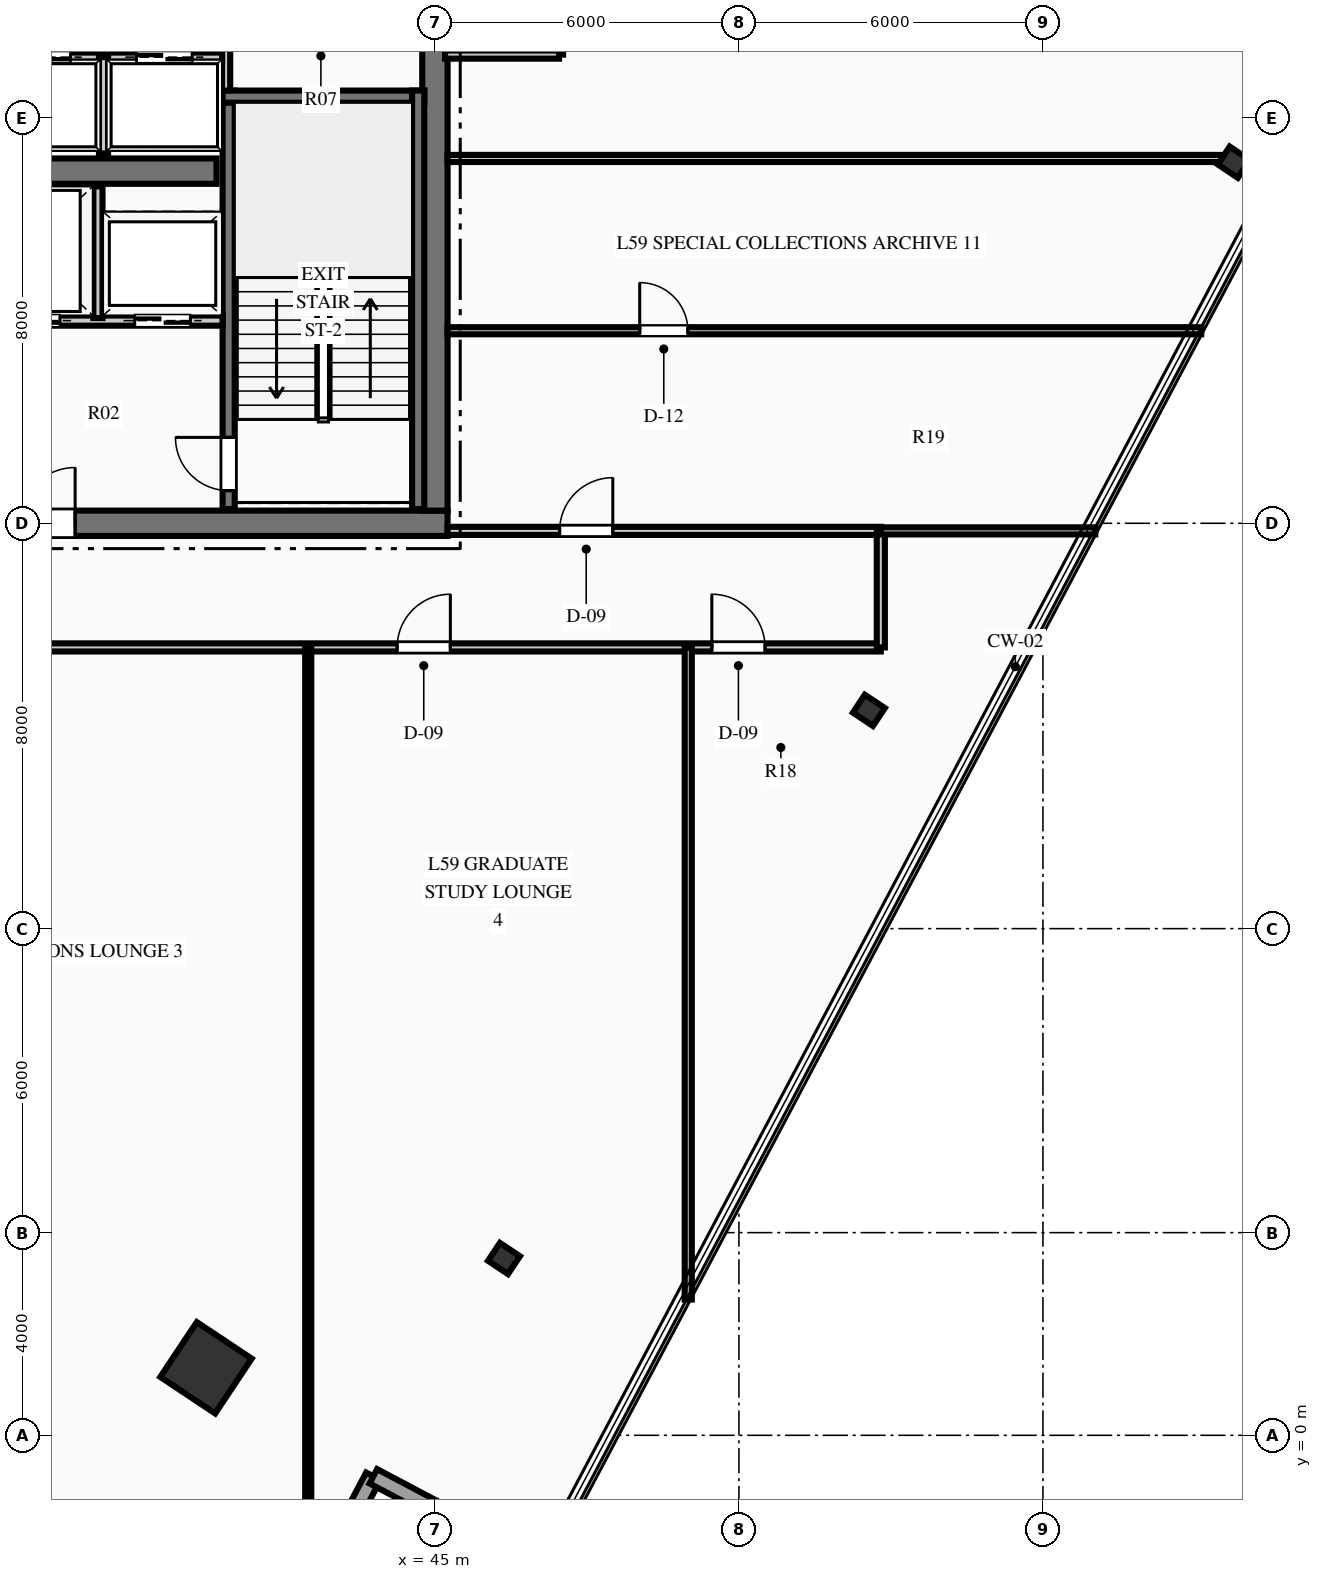
"""IFC4 building model, lengths in metres.
Left out: names, types, materials, properties, quantities, classifications, styles, units other than length and angle.
Written with IfcOpenShell. Run it as: python <this file> out.ifc"""

import sys

from ifc_helpers import new_model, si_unit, direction, frame, frame_2d, origin, origin_2d, place, context, subcontext, project, spatial, rectangle, hollow_rectangle, i_section, extrude, element, fill, save


model = new_model("IFC4")
c1 = context("Model", 3, precision=1e-05, world=origin(), true_north=direction((0.0, 1.0)))
c2 = subcontext(c1, "Body", "Model", "MODEL_VIEW")
j1 = project(units=[si_unit("LENGTHUNIT", "METRE"), si_unit("PLANEANGLEUNIT", "RADIAN")], contexts=[c1])
p1 = place(None, origin())
s1 = spatial("IfcSite", under=j1, at=p1, CompositionType="ELEMENT")
p2 = place(p1, origin())
s2 = spatial("IfcBuilding", under=s1, at=p2, CompositionType="ELEMENT")
p3 = place(p2, frame((0.0, 0.0, 235.95)))
s3 = spatial("IfcBuildingStorey", under=s2, at=p3, CompositionType="ELEMENT", Elevation=235.95)
p4 = place(p3, frame((26.75, 18.0, 0.0), z_axis=(0.0, 0.0, 1.0), x_axis=(1.0, 0.0, 0.0)))
e1 = element("IfcWall", 1, at=p4, inside=s3, PredefinedType="SHEAR", context=c2, shape_type="SweptSolid", body=[
    extrude(rectangle(XDim=18.5, YDim=0.5, at=frame_2d((9.25, 0.0))), origin(), (0.0, 0.0, 1.0), 3.75),
])
p5 = place(p4, frame((7.35, 0.0, 0.0)))
e2 = element("IfcOpeningElement", 2, at=p5, cuts=e1, PredefinedType="OPENING", context=c2, shape_type="SweptSolid", body=[
    extrude(rectangle(XDim=1.1, YDim=2.15, at=frame_2d((0.55, 1.075))), frame((0.0, 0.26, 0.0), z_axis=(0.0, -1.0, 0.0), x_axis=(1.0, 0.0, 0.0)), (0.0, 0.0, 1.0), 0.52),
])
p6 = place(p4, frame((10.05, 0.0, 0.0)))
e3 = element("IfcOpeningElement", 3, at=p6, cuts=e1, PredefinedType="OPENING", context=c2, shape_type="SweptSolid", body=[
    extrude(rectangle(XDim=1.1, YDim=2.15, at=frame_2d((0.55, 1.075))), frame((0.0, 0.26, 0.0), z_axis=(0.0, -1.0, 0.0), x_axis=(1.0, 0.0, 0.0)), (0.0, 0.0, 1.0), 0.52),
])
p7 = place(p3, frame((45.0, 18.25, 0.0), z_axis=(0.0, 0.0, 1.0), x_axis=(0.0, 1.0, 0.0)))
e4 = element("IfcWall", 4, at=p7, inside=s3, PredefinedType="SHEAR", context=c2, shape_type="SweptSolid", body=[
    extrude(rectangle(XDim=15.5, YDim=0.5, at=frame_2d((7.75, 0.0))), origin(), (0.0, 0.0, 1.0), 3.75),
])
p8 = place(p7, frame((9.99, 0.0, 0.0)))
e5 = element("IfcOpeningElement", 5, at=p8, cuts=e4, PredefinedType="OPENING", context=c2, shape_type="SweptSolid", body=[
    extrude(rectangle(XDim=1.4, YDim=2.2, at=frame_2d((0.7, 1.1))), frame((0.0, 0.26, 0.0), z_axis=(0.0, -1.0, 0.0), x_axis=(1.0, 0.0, 0.0)), (0.0, 0.0, 1.0), 0.52),
])
p9 = place(p3, frame((31.31, 24.95, 0.0), z_axis=(0.0, 0.0, 1.0), x_axis=(1.0, 0.0, 0.0)))
e6 = element("IfcWall", 6, at=p9, inside=s3, PredefinedType="SHEAR", context=c2, shape_type="SweptSolid", body=[
    extrude(rectangle(XDim=9.38, YDim=0.5, at=frame_2d((4.69, 0.0))), origin(), (0.0, 0.0, 1.0), 3.75),
])
p10 = place(p3, frame((40.93, 18.28, 0.0), z_axis=(0.0, 0.0, 1.0), x_axis=(0.0, 1.0, 0.0)))
e7 = element("IfcWall", 7, at=p10, inside=s3, PredefinedType="SHEAR", context=c2, shape_type="SweptSolid", body=[
    extrude(rectangle(XDim=8.26, YDim=0.24, at=frame_2d((4.13, 0.0))), origin(), (0.0, 0.0, 1.0), 3.75),
])
p11 = place(p10, frame((0.365, 0.0, 0.0)))
e8 = element("IfcOpeningElement", 8, at=p11, cuts=e7, PredefinedType="OPENING", context=c2, shape_type="SweptSolid", body=[
    extrude(rectangle(XDim=1.05, YDim=2.15, at=frame_2d((0.525, 1.075))), frame((0.0, 0.13, 0.0), z_axis=(0.0, -1.0, 0.0), x_axis=(1.0, 0.0, 0.0)), (0.0, 0.0, 1.0), 0.26),
])
p12 = place(p3, frame((40.81, 26.42, 0.0), z_axis=(0.0, 0.0, 1.0), x_axis=(1.0, 0.0, 0.0)))
e9 = element("IfcWall", 9, at=p12, inside=s3, PredefinedType="SHEAR", context=c2, shape_type="SweptSolid", body=[
    extrude(rectangle(XDim=3.98, YDim=0.24, at=frame_2d((1.99, 0.0))), origin(), (0.0, 0.0, 1.0), 3.75),
])
p13 = place(p3, frame((44.67, 18.28, 0.0), z_axis=(0.0, 0.0, 1.0), x_axis=(0.0, 1.0, 0.0)))
e10 = element("IfcWall", 10, at=p13, inside=s3, PredefinedType="SHEAR", context=c2, shape_type="SweptSolid", body=[
    extrude(rectangle(XDim=8.26, YDim=0.24, at=frame_2d((4.13, 0.0))), origin(), (0.0, 0.0, 1.0), 3.75),
])
p14 = place(p3, frame((40.483, 1.333, 0.0), z_axis=(0.0, 0.0, 1.0), x_axis=(0.554118199338, 0.832437998389, 0.0)))
e11 = element("IfcColumn", 11, at=p14, inside=s3, PredefinedType="COLUMN", context=c2, shape_type="SweptSolid", body=[
    extrude(hollow_rectangle(XDim=1.3, YDim=1.3, WallThickness=0.06, at=origin_2d()), origin(), (0.0, 0.0, 1.0), 3.75),
])
for number, where, z_axis, x_axis in (
    (12, (46.363, 3.49, 0.0), (0.0, 0.0, 1.0), (0.554, 0.832, 0.0)),
    (13, (53.564, 14.308, 0.0), (0.0, 0.0, 1.0), (0.554, 0.832, 0.0)),
    (14, (60.766, 25.126, 0.0), (0.0, 0.0, 1.0), (0.554, 0.832, 0.0)),
):
    element("IfcColumn", number, at=place(p3, frame(where, z_axis=z_axis, x_axis=x_axis)), inside=s3, PredefinedType="COLUMN", context=c2, shape_type="SweptSolid", body=[
        extrude(i_section(OverallWidth=0.424, OverallDepth=0.474, WebThickness=0.048, FlangeThickness=0.077, at=origin_2d()), origin(), (0.0, 0.0, 1.0), 3.75),
    ])
for number, where, z_axis, x_axis in (
    (15, (43.785, -0.809, 0.0), (0.0, 0.0, 1.0), (-0.468, -0.884, 0.0)),
    (16, (47.232, -2.634, 0.0), (0.0, 0.0, 1.0), (-0.884, 0.468, 0.0)),
):
    element("IfcWall", number, at=place(p3, frame(where, z_axis=z_axis, x_axis=x_axis)), inside=s3, PredefinedType="STANDARD", context=c2, shape_type="SweptSolid", body=[
        extrude(rectangle(XDim=3.9, YDim=0.32, at=frame_2d((1.95, 0.0))), origin(), (0.0, 0.0, 1.0), 3.4),
    ])
p15 = place(p3, frame((36.12, 22.0, 0.0), z_axis=(0.0, 0.0, 1.0), x_axis=(1.0, 0.0, 0.0)))
e17 = element("IfcWall", 17, at=p15, inside=s3, PredefinedType="PARTITIONING", context=c2, shape_type="SweptSolid", body=[
    extrude(rectangle(XDim=4.69, YDim=0.2, at=frame_2d((2.345, 0.0))), origin(), (0.0, 0.0, 1.0), 3.4),
])
p16 = place(p15, frame((2.955, 0.0, 0.0)))
e18 = element("IfcOpeningElement", 18, at=p16, cuts=e17, PredefinedType="OPENING", context=c2, shape_type="SweptSolid", body=[
    extrude(rectangle(XDim=1.1, YDim=2.15, at=frame_2d((0.55, 1.075))), frame((0.0, 0.11, 0.0), z_axis=(0.0, -1.0, 0.0), x_axis=(1.0, 0.0, 0.0)), (0.0, 0.0, 1.0), 0.22),
])
p17 = place(p15, frame((0.08, 0.0, 0.0)))
e19 = element("IfcOpeningElement", 19, at=p17, cuts=e17, PredefinedType="OPENING", context=c2, shape_type="SweptSolid", body=[
    extrude(rectangle(XDim=1.4, YDim=2.2, at=frame_2d((0.7, 1.1))), frame((0.0, 0.11, 0.0), z_axis=(0.0, -1.0, 0.0), x_axis=(1.0, 0.0, 0.0)), (0.0, 0.0, 1.0), 0.22),
])
p18 = place(p3, frame((38.35, 22.05, 0.0), z_axis=(0.0, 0.0, 1.0), x_axis=(0.0, 1.0, 0.0)))
e20 = element("IfcWall", 20, at=p18, inside=s3, PredefinedType="PARTITIONING", context=c2, shape_type="SweptSolid", body=[
    extrude(rectangle(XDim=2.6, YDim=0.18, at=frame_2d((1.3, 0.0))), origin(), (0.0, 0.0, 1.0), 3.4),
])
p19 = place(p3, frame((40.88, 26.54, 0.0), z_axis=(0.0, 0.0, 1.0), x_axis=(0.0, 1.0, 0.0)))
e21 = element("IfcWall", 21, at=p19, inside=s3, PredefinedType="PARTITIONING", context=c2, shape_type="SweptSolid", body=[
    extrude(rectangle(XDim=1.51, YDim=0.16, at=frame_2d((0.755, 0.0))), origin(), (0.0, 0.0, 1.0), 3.4),
])
p20 = place(p3, frame((31.2, 27.2, 0.0), z_axis=(0.0, 0.0, 1.0), x_axis=(1.0, 0.0, 0.0)))
e22 = element("IfcWall", 22, at=p20, inside=s3, PredefinedType="PARTITIONING", context=c2, shape_type="SweptSolid", body=[
    extrude(rectangle(XDim=9.6, YDim=0.18, at=frame_2d((4.8, 0.0))), origin(), (0.0, 0.0, 1.0), 3.4),
])
p21 = place(p20, frame((0.59, 0.0, 0.0)))
e23 = element("IfcOpeningElement", 23, at=p21, cuts=e22, PredefinedType="OPENING", context=c2, shape_type="SweptSolid", body=[
    extrude(rectangle(XDim=1.1, YDim=2.15, at=frame_2d((0.55, 1.075))), frame((0.0, 0.1, 0.0), z_axis=(0.0, -1.0, 0.0), x_axis=(1.0, 0.0, 0.0)), (0.0, 0.0, 1.0), 0.2),
])
p22 = place(p20, frame((2.99, 0.0, 0.0)))
e24 = element("IfcOpeningElement", 24, at=p22, cuts=e22, PredefinedType="OPENING", context=c2, shape_type="SweptSolid", body=[
    extrude(rectangle(XDim=1.1, YDim=2.15, at=frame_2d((0.55, 1.075))), frame((0.0, 0.1, 0.0), z_axis=(0.0, -1.0, 0.0), x_axis=(1.0, 0.0, 0.0)), (0.0, 0.0, 1.0), 0.2),
])
p23 = place(p20, frame((5.51, 0.0, 0.0)))
e25 = element("IfcOpeningElement", 25, at=p23, cuts=e22, PredefinedType="OPENING", context=c2, shape_type="SweptSolid", body=[
    extrude(rectangle(XDim=1.1, YDim=2.15, at=frame_2d((0.55, 1.075))), frame((0.0, 0.1, 0.0), z_axis=(0.0, -1.0, 0.0), x_axis=(1.0, 0.0, 0.0)), (0.0, 0.0, 1.0), 0.2),
])
p24 = place(p20, frame((7.91, 0.0, 0.0)))
e26 = element("IfcOpeningElement", 26, at=p24, cuts=e22, PredefinedType="OPENING", context=c2, shape_type="SweptSolid", body=[
    extrude(rectangle(XDim=1.1, YDim=2.15, at=frame_2d((0.55, 1.075))), frame((0.0, 0.1, 0.0), z_axis=(0.0, -1.0, 0.0), x_axis=(1.0, 0.0, 0.0)), (0.0, 0.0, 1.0), 0.2),
])
p25 = place(p3, frame((38.46, 25.3, 0.0), z_axis=(0.0, 0.0, 1.0), x_axis=(0.0, 1.0, 0.0)))
e27 = element("IfcWall", 27, at=p25, inside=s3, PredefinedType="PARTITIONING", context=c2, shape_type="SweptSolid", body=[
    extrude(rectangle(XDim=1.9, YDim=0.18, at=frame_2d((0.95, 0.0))), origin(), (0.0, 0.0, 1.0), 3.4),
])
p26 = place(p3, frame((18.2, 15.55, 0.0), z_axis=(0.0, 0.0, 1.0), x_axis=(1.0, 0.0, 0.0)))
e28 = element("IfcWall", 28, at=p26, inside=s3, PredefinedType="PARTITIONING", context=c2, shape_type="SweptSolid", body=[
    extrude(rectangle(XDim=35.6, YDim=0.16, at=frame_2d((17.8, 0.0))), origin(), (0.0, 0.0, 1.0), 2.938),
])
p27 = place(p26, frame((2.625, 0.0, 0.0)))
e29 = element("IfcOpeningElement", 29, at=p27, cuts=e28, PredefinedType="OPENING", context=c2, shape_type="SweptSolid", body=[
    extrude(rectangle(XDim=1.05, YDim=2.15, at=frame_2d((0.525, 1.075))), frame((0.0, 0.09, 0.0), z_axis=(0.0, -1.0, 0.0), x_axis=(1.0, 0.0, 0.0)), (0.0, 0.0, 1.0), 0.18),
])
p28 = place(p26, frame((9.335, 0.0, 0.0)))
e30 = element("IfcOpeningElement", 30, at=p28, cuts=e28, PredefinedType="OPENING", context=c2, shape_type="SweptSolid", body=[
    extrude(rectangle(XDim=1.05, YDim=2.15, at=frame_2d((0.525, 1.075))), frame((0.0, 0.09, 0.0), z_axis=(0.0, -1.0, 0.0), x_axis=(1.0, 0.0, 0.0)), (0.0, 0.0, 1.0), 0.18),
])
p29 = place(p26, frame((17.775, 0.0, 0.0)))
e31 = element("IfcOpeningElement", 31, at=p29, cuts=e28, PredefinedType="OPENING", context=c2, shape_type="SweptSolid", body=[
    extrude(rectangle(XDim=1.05, YDim=2.15, at=frame_2d((0.525, 1.075))), frame((0.0, 0.09, 0.0), z_axis=(0.0, -1.0, 0.0), x_axis=(1.0, 0.0, 0.0)), (0.0, 0.0, 1.0), 0.18),
])
p30 = place(p26, frame((26.055, 0.0, 0.0)))
e32 = element("IfcOpeningElement", 32, at=p30, cuts=e28, PredefinedType="OPENING", context=c2, shape_type="SweptSolid", body=[
    extrude(rectangle(XDim=1.05, YDim=2.15, at=frame_2d((0.525, 1.075))), frame((0.0, 0.09, 0.0), z_axis=(0.0, -1.0, 0.0), x_axis=(1.0, 0.0, 0.0)), (0.0, 0.0, 1.0), 0.18),
])
p31 = place(p26, frame((32.265, 0.0, 0.0)))
e33 = element("IfcOpeningElement", 33, at=p31, cuts=e28, PredefinedType="OPENING", context=c2, shape_type="SweptSolid", body=[
    extrude(rectangle(XDim=1.05, YDim=2.15, at=frame_2d((0.525, 1.075))), frame((0.0, 0.09, 0.0), z_axis=(0.0, -1.0, 0.0), x_axis=(1.0, 0.0, 0.0)), (0.0, 0.0, 1.0), 0.18),
])
p32 = place(p3, frame((45.25, 17.85, 0.0), z_axis=(0.0, 0.0, 1.0), x_axis=(1.0, 0.0, 0.0)))
e34 = element("IfcWall", 34, at=p32, inside=s3, PredefinedType="PARTITIONING", context=c2, shape_type="SweptSolid", body=[
    extrude(rectangle(XDim=8.55, YDim=0.16, at=frame_2d((4.275, 0.0))), origin(), (0.0, 0.0, 1.0), 3.4),
])
p33 = place(p32, frame((2.211, 0.0, 0.0)))
e35 = element("IfcOpeningElement", 35, at=p33, cuts=e34, PredefinedType="OPENING", context=c2, shape_type="SweptSolid", body=[
    extrude(rectangle(XDim=1.05, YDim=2.15, at=frame_2d((0.525, 1.075))), frame((0.0, 0.09, 0.0), z_axis=(0.0, -1.0, 0.0), x_axis=(1.0, 0.0, 0.0)), (0.0, 0.0, 1.0), 0.18),
])
p34 = place(p3, frame((47.45, 27.25, 0.0), z_axis=(0.0, 0.0, 1.0), x_axis=(0.0, 1.0, 0.0)))
e36 = element("IfcWall", 36, at=p34, inside=s3, PredefinedType="PARTITIONING", context=c2, shape_type="SweptSolid", body=[
    extrude(rectangle(XDim=6.9, YDim=0.16, at=frame_2d((3.45, 0.0))), origin(), (0.0, 0.0, 1.0), 3.4),
])
p35 = place(p34, frame((1.683, 0.0, 0.0)))
e37 = element("IfcOpeningElement", 37, at=p35, cuts=e36, PredefinedType="OPENING", context=c2, shape_type="SweptSolid", body=[
    extrude(rectangle(XDim=1.05, YDim=2.15, at=frame_2d((0.525, 1.075))), frame((0.0, 0.09, 0.0), z_axis=(0.0, -1.0, 0.0), x_axis=(1.0, 0.0, 0.0)), (0.0, 0.0, 1.0), 0.18),
])
p36 = place(p3, frame((45.2, 27.25, 0.0), z_axis=(0.0, 0.0, 1.0), x_axis=(1.0, 0.0, 0.0)))
e38 = element("IfcWall", 38, at=p36, inside=s3, PredefinedType="PARTITIONING", context=c2, shape_type="SweptSolid", body=[
    extrude(rectangle(XDim=2.25, YDim=0.16, at=frame_2d((1.125, 0.0))), origin(), (0.0, 0.0, 1.0), 3.4),
])
p37 = place(p3, frame((53.8, 15.55, 0.0), z_axis=(0.0, 0.0, 1.0), x_axis=(0.0, 1.0, 0.0)))
e39 = element("IfcWall", 39, at=p37, inside=s3, PredefinedType="PARTITIONING", context=c2, shape_type="SweptSolid", body=[
    extrude(rectangle(XDim=2.3, YDim=0.16, at=frame_2d((1.15, 0.0))), origin(), (0.0, 0.0, 1.0), 3.4),
])
p38 = place(p3, frame((53.8, 17.85, 0.0), z_axis=(0.0, 0.0, 1.0), x_axis=(1.0, 0.0, 0.0)))
e40 = element("IfcWall", 40, at=p38, inside=s3, PredefinedType="PARTITIONING", context=c2, shape_type="SweptSolid", body=[
    extrude(rectangle(XDim=4.232, YDim=0.14, at=frame_2d((2.116, 0.0))), origin(), (0.0, 0.0, 1.0), 3.4),
])
p39 = place(p3, frame((42.5, -3.151, 0.0), z_axis=(0.0, 0.0, 1.0), x_axis=(0.0, 1.0, 0.0)))
e41 = element("IfcWall", 41, at=p39, inside=s3, PredefinedType="PARTITIONING", context=c2, shape_type="SweptSolid", body=[
    extrude(rectangle(XDim=18.701, YDim=0.12, at=frame_2d((9.351, 0.0))), origin(), (0.0, 0.0, 1.0), 3.4),
])
p40 = place(p3, frame((50.0, 2.68, 0.0), z_axis=(0.0, 0.0, 1.0), x_axis=(0.0, 1.0, 0.0)))
e42 = element("IfcWall", 42, at=p40, inside=s3, PredefinedType="PARTITIONING", context=c2, shape_type="SweptSolid", body=[
    extrude(rectangle(XDim=12.87, YDim=0.14, at=frame_2d((6.435, 0.0))), origin(), (0.0, 0.0, 1.0), 3.4),
])
p41 = place(p3, frame((45.25, 21.8, 0.0), z_axis=(0.0, 0.0, 1.0), x_axis=(1.0, 0.0, 0.0)))
e43 = element("IfcWall", 43, at=p41, inside=s3, PredefinedType="PARTITIONING", context=c2, shape_type="SweptSolid", body=[
    extrude(rectangle(XDim=14.874, YDim=0.14, at=frame_2d((7.437, 0.0))), origin(), (0.0, 0.0, 1.0), 3.4),
])
p42 = place(p41, frame((3.792, 0.0, 0.0)))
e44 = element("IfcOpeningElement", 44, at=p42, cuts=e43, PredefinedType="OPENING", context=c2, shape_type="SweptSolid", body=[
    extrude(rectangle(XDim=0.95, YDim=2.15, at=frame_2d((0.475, 1.075))), frame((0.0, 0.08, 0.0), z_axis=(0.0, -1.0, 0.0), x_axis=(1.0, 0.0, 0.0)), (0.0, 0.0, 1.0), 0.16),
])
p43 = place(p3, frame((45.25, 25.2, 0.0), z_axis=(0.0, 0.0, 1.0), x_axis=(1.0, 0.0, 0.0)))
e45 = element("IfcWall", 45, at=p43, inside=s3, PredefinedType="PARTITIONING", context=c2, shape_type="SweptSolid", body=[
    extrude(rectangle(XDim=16.674, YDim=0.14, at=frame_2d((8.337, 0.0))), origin(), (0.0, 0.0, 1.0), 2.779),
])
p44 = place(p11, origin())
e46 = element("IfcDoor", 46, at=p44, inside=s3, OperationType="SINGLE_SWING_RIGHT", PredefinedType="DOOR", context=c2, shape_type="SweptSolid", body=[
    extrude(rectangle(XDim=1.05, YDim=2.15, at=frame_2d((0.525, 1.075))), frame((0.0, 0.025, 0.0), z_axis=(0.0, -1.0, 0.0), x_axis=(1.0, 0.0, 0.0)), (0.0, 0.0, 1.0), 0.05),
])
fill(e8, e46)
p45 = place(p6, origin())
e47 = element("IfcDoor", 47, at=p45, inside=s3, OperationType="SINGLE_SWING_RIGHT", PredefinedType="DOOR", context=c2, shape_type="SweptSolid", body=[
    extrude(rectangle(XDim=1.1, YDim=2.15, at=frame_2d((0.55, 1.075))), frame((0.0, 0.025, 0.0), z_axis=(0.0, -1.0, 0.0), x_axis=(1.0, 0.0, 0.0)), (0.0, 0.0, 1.0), 0.05),
])
fill(e3, e47)
p46 = place(p30, origin())
e48 = element("IfcDoor", 48, at=p46, inside=s3, OperationType="SINGLE_SWING_RIGHT", PredefinedType="DOOR", context=c2, shape_type="SweptSolid", body=[
    extrude(rectangle(XDim=1.05, YDim=2.15, at=frame_2d((0.525, 1.075))), frame((0.0, 0.025, 0.0), z_axis=(0.0, -1.0, 0.0), x_axis=(1.0, 0.0, 0.0)), (0.0, 0.0, 1.0), 0.05),
])
fill(e32, e48)
p47 = place(p31, origin())
e49 = element("IfcDoor", 49, at=p47, inside=s3, OperationType="SINGLE_SWING_LEFT", PredefinedType="DOOR", context=c2, shape_type="SweptSolid", body=[
    extrude(rectangle(XDim=1.05, YDim=2.15, at=frame_2d((0.525, 1.075))), frame((0.0, 0.025, 0.0), z_axis=(0.0, -1.0, 0.0), x_axis=(1.0, 0.0, 0.0)), (0.0, 0.0, 1.0), 0.05),
])
fill(e33, e49)
p48 = place(p33, origin())
e50 = element("IfcDoor", 50, at=p48, inside=s3, OperationType="SINGLE_SWING_RIGHT", PredefinedType="DOOR", context=c2, shape_type="SweptSolid", body=[
    extrude(rectangle(XDim=1.05, YDim=2.15, at=frame_2d((0.525, 1.075))), frame((0.0, 0.025, 0.0), z_axis=(0.0, -1.0, 0.0), x_axis=(1.0, 0.0, 0.0)), (0.0, 0.0, 1.0), 0.05),
])
fill(e35, e50)
p49 = place(p42, origin())
e51 = element("IfcDoor", 51, at=p49, inside=s3, OperationType="SINGLE_SWING_LEFT", PredefinedType="DOOR", context=c2, shape_type="SweptSolid", body=[
    extrude(rectangle(XDim=0.95, YDim=2.15, at=frame_2d((0.475, 1.075))), frame((0.0, 0.025, 0.0), z_axis=(0.0, -1.0, 0.0), x_axis=(1.0, 0.0, 0.0)), (0.0, 0.0, 1.0), 0.05),
])
fill(e44, e51)
p50 = place(p23, origin())
e52 = element("IfcDoor", 52, at=p50, inside=s3, OperationType="SLIDING_TO_LEFT", PredefinedType="DOOR", context=c2, shape_type="SweptSolid", body=[
    extrude(rectangle(XDim=1.1, YDim=2.15, at=frame_2d((0.55, 1.075))), frame((0.0, 0.025, 0.0), z_axis=(0.0, -1.0, 0.0), x_axis=(1.0, 0.0, 0.0)), (0.0, 0.0, 1.0), 0.05),
])
fill(e25, e52)
p51 = place(p24, origin())
e53 = element("IfcDoor", 53, at=p51, inside=s3, OperationType="SLIDING_TO_LEFT", PredefinedType="DOOR", context=c2, shape_type="SweptSolid", body=[
    extrude(rectangle(XDim=1.1, YDim=2.15, at=frame_2d((0.55, 1.075))), frame((0.0, 0.025, 0.0), z_axis=(0.0, -1.0, 0.0), x_axis=(1.0, 0.0, 0.0)), (0.0, 0.0, 1.0), 0.05),
])
fill(e26, e53)
p52 = place(p16, origin())
e54 = element("IfcDoor", 54, at=p52, inside=s3, OperationType="SLIDING_TO_LEFT", PredefinedType="DOOR", context=c2, shape_type="SweptSolid", body=[
    extrude(rectangle(XDim=1.1, YDim=2.15, at=frame_2d((0.55, 1.075))), frame((0.0, 0.025, 0.0), z_axis=(0.0, -1.0, 0.0), x_axis=(1.0, 0.0, 0.0)), (0.0, 0.0, 1.0), 0.05),
])
fill(e18, e54)
p53 = place(p17, origin())
e55 = element("IfcDoor", 55, at=p53, inside=s3, OperationType="SLIDING_TO_LEFT", PredefinedType="DOOR", context=c2, shape_type="SweptSolid", body=[
    extrude(rectangle(XDim=1.4, YDim=2.2, at=frame_2d((0.7, 1.1))), frame((0.0, 0.025, 0.0), z_axis=(0.0, -1.0, 0.0), x_axis=(1.0, 0.0, 0.0)), (0.0, 0.0, 1.0), 0.05),
])
fill(e19, e55)
save(model, sys.argv[1])
